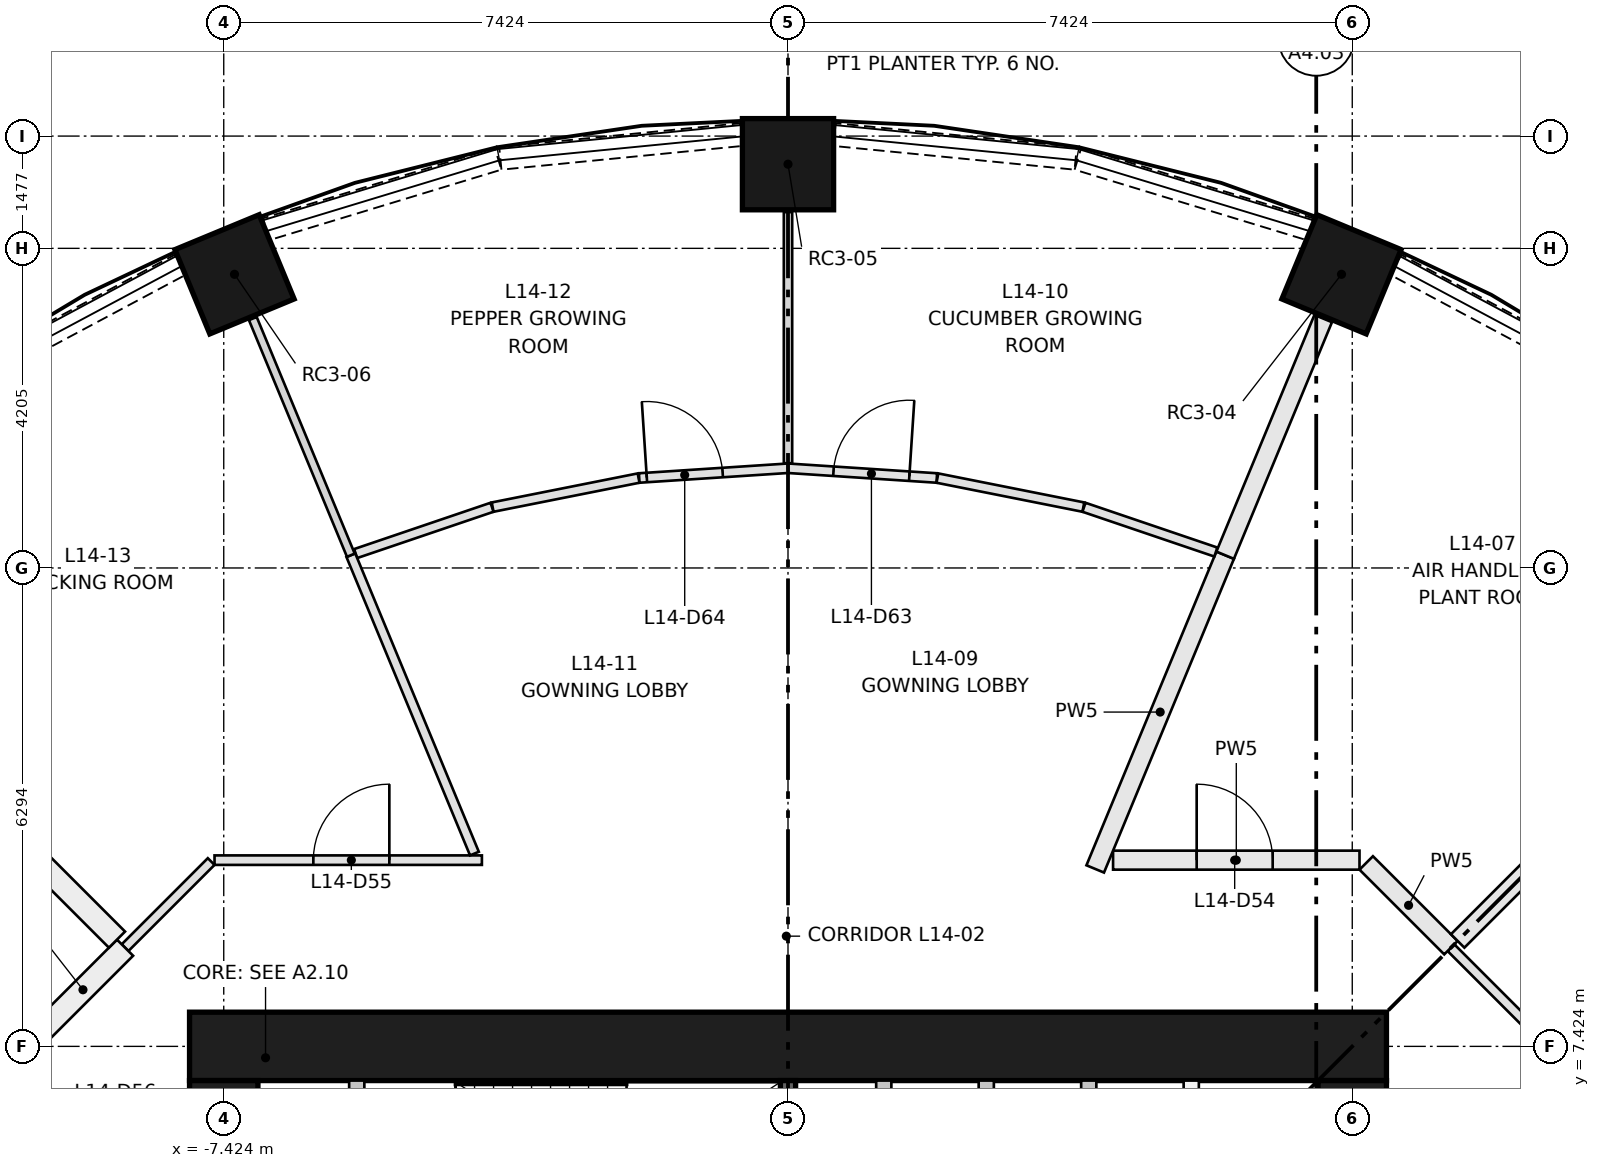
"""IFC4 building model, lengths in metres.
Left out: names, types, materials, properties, quantities, classifications, styles, units other than length and angle.
Written with IfcOpenShell. Run it as: python <this file> out.ifc"""

import sys

from ifc_helpers import new_model, si_unit, direction, frame, frame_2d, origin, origin_2d, place, context, subcontext, project, spatial, rectangle, extrude, element, fill, save


model = new_model("IFC4")
c1 = context("Model", 3, precision=1e-05, world=origin(), true_north=direction((0.0, 1.0)))
c2 = subcontext(c1, "Body", "Model", "MODEL_VIEW")
j1 = project(units=[si_unit("LENGTHUNIT", "METRE"), si_unit("PLANEANGLEUNIT", "RADIAN")], contexts=[c1])
p1 = place(None, origin())
s1 = spatial("IfcSite", under=j1, at=p1, CompositionType="ELEMENT")
p2 = place(p1, origin())
s2 = spatial("IfcBuilding", under=s1, at=p2, CompositionType="ELEMENT")
p3 = place(p2, frame((0.0, 0.0, 55.4)))
s3 = spatial("IfcBuildingStorey", under=s2, at=p3, CompositionType="ELEMENT", Elevation=55.4)
for number, where, z_axis, x_axis in (
    (1, (7.282, 17.582, 0.0), (0.0, 0.0, 1.0), (0.383, 0.924, 0.0)),
    (2, (0.0, 19.03, 0.0), (0.0, 0.0, 1.0), (0.0, 1.0, 0.0)),
    (3, (-7.282, 17.582, 0.0), (0.0, 0.0, 1.0), (-0.383, 0.924, 0.0)),
):
    element("IfcColumn", number, at=place(p3, frame(where, z_axis=z_axis, x_axis=x_axis)), inside=s3, PredefinedType="COLUMN", context=c2, shape_type="SweptSolid", body=[
        extrude(rectangle(XDim=1.2, YDim=1.2, at=origin_2d()), origin(), (0.0, 0.0, 1.0), 3.65),
    ])
p4 = place(p3, frame((-7.874, 7.424, 0.0), z_axis=(0.0, 0.0, 1.0), x_axis=(1.0, 0.0, 0.0)))
e4 = element("IfcWall", 4, at=p4, inside=s3, PredefinedType="SHEAR", context=c2, shape_type="SweptSolid", body=[
    extrude(rectangle(XDim=15.748, YDim=0.9, at=frame_2d((7.874, 0.0))), origin(), (0.0, 0.0, 1.0), 3.65),
])
p5 = place(p3, frame((-7.424, -6.974, 0.0), z_axis=(0.0, 0.0, 1.0), x_axis=(0.0, 1.0, 0.0)))
e5 = element("IfcWall", 5, at=p5, inside=s3, PredefinedType="SHEAR", context=c2, shape_type="SweptSolid", body=[
    extrude(rectangle(XDim=13.948, YDim=0.9, at=frame_2d((6.974, 0.0))), origin(), (0.0, 0.0, 1.0), 3.65),
])
p6 = place(p5, frame((6.474, 0.0, 0.0)))
e6 = element("IfcOpeningElement", 6, at=p6, cuts=e5, PredefinedType="OPENING", context=c2, shape_type="SweptSolid", body=[
    extrude(rectangle(XDim=1.0, YDim=2.1, at=frame_2d((0.5, 1.05))), frame((0.0, 0.46, 0.0), z_axis=(0.0, -1.0, 0.0), x_axis=(1.0, 0.0, 0.0)), (0.0, 0.0, 1.0), 0.92),
])
p7 = place(p5, frame((3.35, 0.0, 0.0)))
e7 = element("IfcOpeningElement", 7, at=p7, cuts=e5, PredefinedType="OPENING", context=c2, shape_type="SweptSolid", body=[
    extrude(rectangle(XDim=1.8, YDim=2.1, at=frame_2d((0.9, 1.05))), frame((0.0, 0.46, 0.0), z_axis=(0.0, -1.0, 0.0), x_axis=(1.0, 0.0, 0.0)), (0.0, 0.0, 1.0), 0.92),
])
p8 = place(p5, frame((8.799, 0.0, 0.0)))
e8 = element("IfcOpeningElement", 8, at=p8, cuts=e5, PredefinedType="OPENING", context=c2, shape_type="SweptSolid", body=[
    extrude(rectangle(XDim=1.8, YDim=2.1, at=frame_2d((0.9, 1.05))), frame((0.0, 0.46, 0.0), z_axis=(0.0, -1.0, 0.0), x_axis=(1.0, 0.0, 0.0)), (0.0, 0.0, 1.0), 0.92),
])
p9 = place(p5, frame((11.974, 0.0, 0.0)))
e9 = element("IfcOpeningElement", 9, at=p9, cuts=e5, PredefinedType="OPENING", context=c2, shape_type="SweptSolid", body=[
    extrude(rectangle(XDim=1.0, YDim=2.1, at=frame_2d((0.5, 1.05))), frame((0.0, 0.46, 0.0), z_axis=(0.0, -1.0, 0.0), x_axis=(1.0, 0.0, 0.0)), (0.0, 0.0, 1.0), 0.92),
])
p10 = place(p3, frame((7.424, -6.974, 0.0), z_axis=(0.0, 0.0, 1.0), x_axis=(0.0, 1.0, 0.0)))
e10 = element("IfcWall", 10, at=p10, inside=s3, PredefinedType="SHEAR", context=c2, shape_type="SweptSolid", body=[
    extrude(rectangle(XDim=13.948, YDim=0.9, at=frame_2d((6.974, 0.0))), origin(), (0.0, 0.0, 1.0), 3.65),
])
p11 = place(p10, frame((6.474, 0.0, 0.0)))
e11 = element("IfcOpeningElement", 11, at=p11, cuts=e10, PredefinedType="OPENING", context=c2, shape_type="SweptSolid", body=[
    extrude(rectangle(XDim=1.0, YDim=2.1, at=frame_2d((0.5, 1.05))), frame((0.0, 0.46, 0.0), z_axis=(0.0, -1.0, 0.0), x_axis=(1.0, 0.0, 0.0)), (0.0, 0.0, 1.0), 0.92),
])
p12 = place(p10, frame((3.35, 0.0, 0.0)))
e12 = element("IfcOpeningElement", 12, at=p12, cuts=e10, PredefinedType="OPENING", context=c2, shape_type="SweptSolid", body=[
    extrude(rectangle(XDim=1.8, YDim=2.1, at=frame_2d((0.9, 1.05))), frame((0.0, 0.46, 0.0), z_axis=(0.0, -1.0, 0.0), x_axis=(1.0, 0.0, 0.0)), (0.0, 0.0, 1.0), 0.92),
])
p13 = place(p10, frame((8.799, 0.0, 0.0)))
e13 = element("IfcOpeningElement", 13, at=p13, cuts=e10, PredefinedType="OPENING", context=c2, shape_type="SweptSolid", body=[
    extrude(rectangle(XDim=1.8, YDim=2.1, at=frame_2d((0.9, 1.05))), frame((0.0, 0.46, 0.0), z_axis=(0.0, -1.0, 0.0), x_axis=(1.0, 0.0, 0.0)), (0.0, 0.0, 1.0), 0.92),
])
p14 = place(p3, frame((0.0, 5.574, 0.0), z_axis=(0.0, 0.0, 1.0), x_axis=(0.0, 1.0, 0.0)))
e14 = element("IfcWall", 14, at=p14, inside=s3, PredefinedType="SHEAR", context=c2, shape_type="SweptSolid", body=[
    extrude(rectangle(XDim=1.4, YDim=0.2, at=frame_2d((0.7, 0.0))), origin(), (0.0, 0.0, 1.0), 3.3),
])
for number, where, z_axis, x_axis in (
    (15, (1.26, 4.174, 0.0), (0.0, 0.0, 1.0), (0.0, 1.0, 0.0)),
    (16, (2.609, 4.174, 0.0), (0.0, 0.0, 1.0), (0.0, 1.0, 0.0)),
    (17, (3.957, 4.174, 0.0), (0.0, 0.0, 1.0), (0.0, 1.0, 0.0)),
    (18, (5.305, 4.174, 0.0), (0.0, 0.0, 1.0), (0.0, 1.0, 0.0)),
):
    element("IfcWall", number, at=place(p3, frame(where, z_axis=z_axis, x_axis=x_axis)), inside=s3, PredefinedType="PARTITIONING", context=c2, shape_type="SweptSolid", body=[
        extrude(rectangle(XDim=2.8, YDim=0.2, at=frame_2d((1.4, 0.0))), origin(), (0.0, 0.0, 1.0), 3.3),
    ])
p15 = place(p3, frame((-5.674, 4.174, 0.0), z_axis=(0.0, 0.0, 1.0), x_axis=(0.0, 1.0, 0.0)))
e19 = element("IfcWall", 19, at=p15, inside=s3, PredefinedType="PARTITIONING", context=c2, shape_type="SweptSolid", body=[
    extrude(rectangle(XDim=2.8, YDim=0.2, at=frame_2d((1.4, 0.0))), origin(), (0.0, 0.0, 1.0), 3.3),
])
p16 = place(p15, frame((0.125, 0.0, 0.0)))
e20 = element("IfcOpeningElement", 20, at=p16, cuts=e19, PredefinedType="OPENING", context=c2, shape_type="SweptSolid", body=[
    extrude(rectangle(XDim=0.95, YDim=2.1, at=frame_2d((0.475, 1.05))), frame((0.0, 0.11, 0.0), z_axis=(0.0, -1.0, 0.0), x_axis=(1.0, 0.0, 0.0)), (0.0, 0.0, 1.0), 0.22),
])
p17 = place(p15, frame((1.725, 0.0, 0.0)))
e21 = element("IfcOpeningElement", 21, at=p17, cuts=e19, PredefinedType="OPENING", context=c2, shape_type="SweptSolid", body=[
    extrude(rectangle(XDim=0.95, YDim=2.1, at=frame_2d((0.475, 1.05))), frame((0.0, 0.11, 0.0), z_axis=(0.0, -1.0, 0.0), x_axis=(1.0, 0.0, 0.0)), (0.0, 0.0, 1.0), 0.22),
])
p18 = place(p3, frame((10.809, 16.204, 0.0), z_axis=(0.0, 0.0, 1.0), x_axis=(-0.881994263934, 0.471260138764, 0.0)))
e22 = element("IfcWall", 22, at=p18, inside=s3, PredefinedType="SOLIDWALL", context=c2, shape_type="SweptSolid", body=[
    extrude(rectangle(XDim=3.187, YDim=0.3, at=frame_2d((1.593, 0.0))), origin(), (0.0, 0.0, 1.0), 0.9),
])
p19 = place(p3, frame((6.865, 18.175, 0.0), z_axis=(0.0, 0.0, 1.0), x_axis=(-0.956849017819, 0.290585541792, 0.0)))
e23 = element("IfcWall", 23, at=p19, inside=s3, PredefinedType="SOLIDWALL", context=c2, shape_type="SweptSolid", body=[
    extrude(rectangle(XDim=3.188, YDim=0.3, at=frame_2d((1.594, 0.0))), origin(), (0.0, 0.0, 1.0), 0.9),
])
for number, where, z_axis, x_axis in (
    (24, (3.785, 19.107, 0.0), (0.0, 0.0, 1.0), (-0.995, 0.098, 0.0)),
    (25, (-0.613, 19.419, 0.0), (0.0, 0.0, 1.0), (-0.995, -0.098, 0.0)),
):
    element("IfcWall", number, at=place(p3, frame(where, z_axis=z_axis, x_axis=x_axis)), inside=s3, PredefinedType="SOLIDWALL", context=c2, shape_type="SweptSolid", body=[
        extrude(rectangle(XDim=3.188, YDim=0.3, at=frame_2d((1.594, 0.0))), origin(), (0.0, 0.0, 1.0), 0.9),
    ])
p20 = place(p3, frame((-3.814, 19.102, 0.0), z_axis=(0.0, 0.0, 1.0), x_axis=(-0.956849017819, -0.290585541792, 0.0)))
e26 = element("IfcWall", 26, at=p20, inside=s3, PredefinedType="SOLIDWALL", context=c2, shape_type="SweptSolid", body=[
    extrude(rectangle(XDim=3.188, YDim=0.3, at=frame_2d((1.594, 0.0))), origin(), (0.0, 0.0, 1.0), 0.9),
])
p21 = place(p3, frame((-7.998, 17.706, 0.0), z_axis=(0.0, 0.0, 1.0), x_axis=(-0.881994263934, -0.471260138764, 0.0)))
e27 = element("IfcWall", 27, at=p21, inside=s3, PredefinedType="SOLIDWALL", context=c2, shape_type="SweptSolid", body=[
    extrude(rectangle(XDim=3.187, YDim=0.3, at=frame_2d((1.593, 0.0))), origin(), (0.0, 0.0, 1.0), 0.9),
])
p22 = place(p3, frame((8.722, 8.722, 0.0), z_axis=(0.0, 0.0, 1.0), x_axis=(0.70718294931, -0.707030604857, 0.0)))
e28 = element("IfcWall", 28, at=p22, inside=s3, PredefinedType="PARTITIONING", context=c2, shape_type="SweptSolid", body=[
    extrude(rectangle(XDim=1.603, YDim=0.125, at=frame_2d((0.801, 0.0))), origin(), (0.0, 0.0, 1.0), 3.3),
])
p23 = place(p3, frame((4.277, 9.874, 0.0), z_axis=(0.0, 0.0, 1.0), x_axis=(1.0, 0.0, 0.0)))
e29 = element("IfcWall", 29, at=p23, inside=s3, PredefinedType="PARTITIONING", context=c2, shape_type="SweptSolid", body=[
    extrude(rectangle(XDim=3.242, YDim=0.25, at=frame_2d((1.621, 0.0))), origin(), (0.0, 0.0, 1.0), 3.3),
])
p24 = place(p23, frame((1.1, 0.0, 0.0)))
e30 = element("IfcOpeningElement", 30, at=p24, cuts=e29, PredefinedType="OPENING", context=c2, shape_type="SweptSolid", body=[
    extrude(rectangle(XDim=1.0, YDim=2.1, at=frame_2d((0.5, 1.05))), frame((0.0, 0.135, 0.0), z_axis=(0.0, -1.0, 0.0), x_axis=(1.0, 0.0, 0.0)), (0.0, 0.0, 1.0), 0.27),
])
p25 = place(p3, frame((7.608, 9.837, 0.0), z_axis=(0.0, 0.0, 1.0), x_axis=(0.707029353672, -0.707184200224, 0.0)))
e31 = element("IfcWall", 31, at=p25, inside=s3, PredefinedType="PARTITIONING", context=c2, shape_type="SweptSolid", body=[
    extrude(rectangle(XDim=1.577, YDim=0.25, at=frame_2d((0.788, 0.0))), origin(), (0.0, 0.0, 1.0), 3.3),
])
p26 = place(p3, frame((-8.722, 8.722, 0.0), z_axis=(0.0, 0.0, 1.0), x_axis=(0.707030604857, 0.70718294931, 0.0)))
e32 = element("IfcWall", 32, at=p26, inside=s3, PredefinedType="PARTITIONING", context=c2, shape_type="SweptSolid", body=[
    extrude(rectangle(XDim=1.603, YDim=0.125, at=frame_2d((0.801, 0.0))), origin(), (0.0, 0.0, 1.0), 3.3),
])
p27 = place(p3, frame((-7.545, 9.874, 0.0), z_axis=(0.0, 0.0, 1.0), x_axis=(1.0, 0.0, 0.0)))
e33 = element("IfcWall", 33, at=p27, inside=s3, PredefinedType="PARTITIONING", context=c2, shape_type="SweptSolid", body=[
    extrude(rectangle(XDim=3.518, YDim=0.125, at=frame_2d((1.759, 0.0))), origin(), (0.0, 0.0, 1.0), 3.3),
])
p28 = place(p27, frame((1.3, 0.0, 0.0)))
e34 = element("IfcOpeningElement", 34, at=p28, cuts=e33, PredefinedType="OPENING", context=c2, shape_type="SweptSolid", body=[
    extrude(rectangle(XDim=1.0, YDim=2.1, at=frame_2d((0.5, 1.05))), frame((0.0, 0.073, 0.0), z_axis=(0.0, -1.0, 0.0), x_axis=(1.0, 0.0, 0.0)), (0.0, 0.0, 1.0), 0.145),
])
p29 = place(p3, frame((-9.83, 7.615, 0.0), z_axis=(0.0, 0.0, 1.0), x_axis=(0.70718471217, 0.707028841614, 0.0)))
e35 = element("IfcWall", 35, at=p29, inside=s3, PredefinedType="PARTITIONING", context=c2, shape_type="SweptSolid", body=[
    extrude(rectangle(XDim=1.566, YDim=0.3, at=frame_2d((0.783, 0.0))), origin(), (0.0, 0.0, 1.0), 3.3),
])
p30 = place(p3, frame((13.011, 13.011, 0.0), z_axis=(0.0, 0.0, 1.0), x_axis=(-0.707106781187, -0.707106781187, 0.0)))
e36 = element("IfcWall", 36, at=p30, inside=s3, PredefinedType="PARTITIONING", context=c2, shape_type="SweptSolid", body=[
    extrude(rectangle(XDim=5.94, YDim=0.25, at=frame_2d((2.97, 0.0))), origin(), (0.0, 0.0, 1.0), 3.3),
])
p31 = place(p3, frame((4.042, 9.759, 0.0), z_axis=(0.0, 0.0, 1.0), x_axis=(0.382697682956, 0.923873629595, 0.0)))
e37 = element("IfcWall", 37, at=p31, inside=s3, PredefinedType="PARTITIONING", context=c2, shape_type="SweptSolid", body=[
    extrude(rectangle(XDim=4.468, YDim=0.25, at=frame_2d((2.234, 0.0))), origin(), (0.0, 0.0, 1.0), 3.3),
])
p32 = place(p3, frame((5.752, 13.886, 0.0), z_axis=(0.0, 0.0, 1.0), x_axis=(0.382716478617, 0.923865843613, 0.0)))
e38 = element("IfcWall", 38, at=p32, inside=s3, PredefinedType="PARTITIONING", context=c2, shape_type="SweptSolid", body=[
    extrude(rectangle(XDim=3.37, YDim=0.25, at=frame_2d((1.685, 0.0))), origin(), (0.0, 0.0, 1.0), 3.3),
])
p33 = place(p3, frame((0.0, 15.03, 0.0), z_axis=(0.0, 0.0, 1.0), x_axis=(0.997855616904, -0.065453554619, 0.0)))
e39 = element("IfcWall", 39, at=p33, inside=s3, PredefinedType="PARTITIONING", context=c2, shape_type="SweptSolid", body=[
    extrude(rectangle(XDim=1.962, YDim=0.125, at=frame_2d((0.981, 0.0))), origin(), (0.0, 0.0, 1.0), 3.3),
])
p34 = place(p33, frame((0.6, 0.0, 0.0)))
e40 = element("IfcOpeningElement", 40, at=p34, cuts=e39, PredefinedType="OPENING", context=c2, shape_type="SweptSolid", body=[
    extrude(rectangle(XDim=1.0, YDim=2.1, at=frame_2d((0.5, 1.05))), frame((0.0, 0.073, 0.0), z_axis=(0.0, -1.0, 0.0), x_axis=(1.0, 0.0, 0.0)), (0.0, 0.0, 1.0), 0.145),
])
p35 = place(p3, frame((1.966, 14.901, 0.0), z_axis=(0.0, 0.0, 1.0), x_axis=(0.980795915473, -0.19503684829, 0.0)))
e41 = element("IfcWall", 41, at=p35, inside=s3, PredefinedType="PARTITIONING", context=c2, shape_type="SweptSolid", body=[
    extrude(rectangle(XDim=1.958, YDim=0.125, at=frame_2d((0.979, 0.0))), origin(), (0.0, 0.0, 1.0), 3.3),
])
p36 = place(p3, frame((3.894, 14.517, 0.0), z_axis=(0.0, 0.0, 1.0), x_axis=(0.946909907848, -0.321499030201, 0.0)))
e42 = element("IfcWall", 42, at=p36, inside=s3, PredefinedType="PARTITIONING", context=c2, shape_type="SweptSolid", body=[
    extrude(rectangle(XDim=1.832, YDim=0.125, at=frame_2d((0.916, 0.0))), origin(), (0.0, 0.0, 1.0), 3.3),
])
p37 = place(p3, frame((0.0, 15.096, 0.0), z_axis=(0.0, 0.0, 1.0), x_axis=(0.0, 1.0, 0.0)))
e43 = element("IfcWall", 43, at=p37, inside=s3, PredefinedType="PARTITIONING", context=c2, shape_type="SweptSolid", body=[
    extrude(rectangle(XDim=3.304, YDim=0.11, at=frame_2d((1.652, 0.0))), origin(), (0.0, 0.0, 1.0), 3.3),
])
p38 = place(p3, frame((-5.688, 13.907, 0.0), z_axis=(0.0, 0.0, 1.0), x_axis=(0.946929690395, 0.321440758848, 0.0)))
e44 = element("IfcWall", 44, at=p38, inside=s3, PredefinedType="PARTITIONING", context=c2, shape_type="SweptSolid", body=[
    extrude(rectangle(XDim=1.895, YDim=0.125, at=frame_2d((0.948, 0.0))), origin(), (0.0, 0.0, 1.0), 3.3),
])
p39 = place(p3, frame((-3.886, 14.519, 0.0), z_axis=(0.0, 0.0, 1.0), x_axis=(0.980795915473, 0.19503684829, 0.0)))
e45 = element("IfcWall", 45, at=p39, inside=s3, PredefinedType="PARTITIONING", context=c2, shape_type="SweptSolid", body=[
    extrude(rectangle(XDim=1.958, YDim=0.125, at=frame_2d((0.979, 0.0))), origin(), (0.0, 0.0, 1.0), 3.3),
])
p40 = place(p3, frame((-1.958, 14.902, 0.0), z_axis=(0.0, 0.0, 1.0), x_axis=(0.997855616904, 0.065453554619, 0.0)))
e46 = element("IfcWall", 46, at=p40, inside=s3, PredefinedType="PARTITIONING", context=c2, shape_type="SweptSolid", body=[
    extrude(rectangle(XDim=1.962, YDim=0.125, at=frame_2d((0.981, 0.0))), origin(), (0.0, 0.0, 1.0), 3.3),
])
p41 = place(p40, frame((0.1, 0.0, 0.0)))
e47 = element("IfcOpeningElement", 47, at=p41, cuts=e46, PredefinedType="OPENING", context=c2, shape_type="SweptSolid", body=[
    extrude(rectangle(XDim=1.0, YDim=2.1, at=frame_2d((0.5, 1.05))), frame((0.0, 0.073, 0.0), z_axis=(0.0, -1.0, 0.0), x_axis=(1.0, 0.0, 0.0)), (0.0, 0.0, 1.0), 0.145),
])
p42 = place(p3, frame((-4.126, 9.96, 0.0), z_axis=(0.0, 0.0, 1.0), x_axis=(-0.382676572561, 0.923882373905, 0.0)))
e48 = element("IfcWall", 48, at=p42, inside=s3, PredefinedType="PARTITIONING", context=c2, shape_type="SweptSolid", body=[
    extrude(rectangle(XDim=4.249, YDim=0.125, at=frame_2d((2.125, 0.0))), origin(), (0.0, 0.0, 1.0), 3.3),
])
p43 = place(p3, frame((-5.752, 13.886, 0.0), z_axis=(0.0, 0.0, 1.0), x_axis=(-0.382716478617, 0.923865843613, 0.0)))
e49 = element("IfcWall", 49, at=p43, inside=s3, PredefinedType="PARTITIONING", context=c2, shape_type="SweptSolid", body=[
    extrude(rectangle(XDim=3.37, YDim=0.11, at=frame_2d((1.685, 0.0))), origin(), (0.0, 0.0, 1.0), 3.3),
])
p44 = place(p3, frame((-8.829, 8.829, 0.0), z_axis=(0.0, 0.0, 1.0), x_axis=(-0.707106781187, 0.707106781187, 0.0)))
e50 = element("IfcWall", 50, at=p44, inside=s3, PredefinedType="PARTITIONING", context=c2, shape_type="SweptSolid", body=[
    extrude(rectangle(XDim=5.914, YDim=0.3, at=frame_2d((2.957, 0.0))), origin(), (0.0, 0.0, 1.0), 3.3),
])
p45 = place(p24, origin())
e51 = element("IfcDoor", 51, at=p45, inside=s3, OperationType="SINGLE_SWING_LEFT", PredefinedType="DOOR", context=c2, shape_type="SweptSolid", body=[
    extrude(rectangle(XDim=1.0, YDim=2.1, at=frame_2d((0.5, 1.05))), frame((0.0, 0.025, 0.0), z_axis=(0.0, -1.0, 0.0), x_axis=(1.0, 0.0, 0.0)), (0.0, 0.0, 1.0), 0.05),
])
fill(e30, e51)
p46 = place(p28, origin())
e52 = element("IfcDoor", 52, at=p46, inside=s3, OperationType="SINGLE_SWING_RIGHT", PredefinedType="DOOR", context=c2, shape_type="SweptSolid", body=[
    extrude(rectangle(XDim=1.0, YDim=2.1, at=frame_2d((0.5, 1.05))), frame((0.0, 0.025, 0.0), z_axis=(0.0, -1.0, 0.0), x_axis=(1.0, 0.0, 0.0)), (0.0, 0.0, 1.0), 0.05),
])
fill(e34, e52)
p47 = place(p34, origin())
e53 = element("IfcDoor", 53, at=p47, inside=s3, OperationType="SINGLE_SWING_RIGHT", PredefinedType="DOOR", context=c2, shape_type="SweptSolid", body=[
    extrude(rectangle(XDim=1.0, YDim=2.1, at=frame_2d((0.5, 1.05))), frame((0.0, 0.025, 0.0), z_axis=(0.0, -1.0, 0.0), x_axis=(1.0, 0.0, 0.0)), (0.0, 0.0, 1.0), 0.05),
])
fill(e40, e53)
p48 = place(p41, origin())
e54 = element("IfcDoor", 54, at=p48, inside=s3, OperationType="SINGLE_SWING_LEFT", PredefinedType="DOOR", context=c2, shape_type="SweptSolid", body=[
    extrude(rectangle(XDim=1.0, YDim=2.1, at=frame_2d((0.5, 1.05))), frame((0.0, 0.025, 0.0), z_axis=(0.0, -1.0, 0.0), x_axis=(1.0, 0.0, 0.0)), (0.0, 0.0, 1.0), 0.05),
])
fill(e47, e54)
save(model, sys.argv[1])
